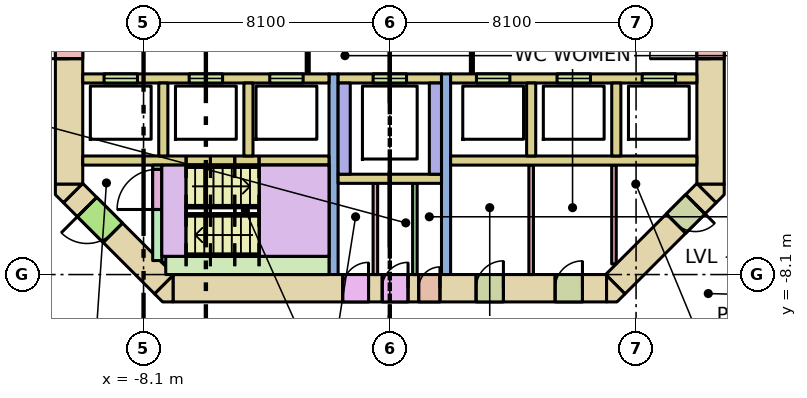
"""IFC4 building model, lengths in metres.
Left out: names, types, materials, properties, quantities, classifications, styles, units other than length and angle.
Written with IfcOpenShell. Run it as: python <this file> out.ifc"""

import sys

from ifc_helpers import new_model, si_unit, direction, frame, frame_2d, origin, place, context, subcontext, project, spatial, polyline, rectangle, outline, extrude, element, fill, save


model = new_model("IFC4")
c1 = context("Model", 3, precision=1e-05, world=origin(), true_north=direction((0.0, 1.0)))
c2 = subcontext(c1, "Body", "Model", "MODEL_VIEW")
j1 = project(units=[si_unit("LENGTHUNIT", "METRE"), si_unit("PLANEANGLEUNIT", "RADIAN")], contexts=[c1])
p1 = place(None, origin())
s1 = spatial("IfcSite", under=j1, at=p1, CompositionType="ELEMENT")
p2 = place(p1, origin())
s2 = spatial("IfcBuilding", under=s1, at=p2, CompositionType="ELEMENT")
p3 = place(p2, origin())
s3 = spatial("IfcBuildingStorey", under=s2, at=p3, CompositionType="ELEMENT", Elevation=0.0)
p4 = place(p3, frame((-7.13, -8.55, -0.32), z_axis=(0.0, 0.0, 1.0), x_axis=(1.0, 0.0, 0.0)))
e1 = element("IfcWall", 1, at=p4, inside=s3, PredefinedType="SHEAR", context=c2, shape_type="SweptSolid", body=[
    extrude(rectangle(XDim=14.26, YDim=0.9, at=frame_2d((7.13, 0.0))), origin(), (0.0, 0.0, 1.0), 6.0),
])
p5 = place(p4, frame((8.08, 0.0, 0.32)))
e2 = element("IfcOpeningElement", 2, at=p5, cuts=e1, PredefinedType="OPENING", context=c2, shape_type="SweptSolid", body=[
    extrude(rectangle(XDim=0.7, YDim=2.1, at=frame_2d((0.35, 1.05))), frame((0.0, 0.46, 0.0), z_axis=(0.0, -1.0, 0.0), x_axis=(1.0, 0.0, 0.0)), (0.0, 0.0, 1.0), 0.92),
])
p6 = place(p4, frame((5.58, 0.0, 0.32)))
e3 = element("IfcOpeningElement", 3, at=p6, cuts=e1, PredefinedType="OPENING", context=c2, shape_type="SweptSolid", body=[
    extrude(rectangle(XDim=0.85, YDim=2.1, at=frame_2d((0.425, 1.05))), frame((0.0, 0.46, 0.0), z_axis=(0.0, -1.0, 0.0), x_axis=(1.0, 0.0, 0.0)), (0.0, 0.0, 1.0), 0.92),
])
p7 = place(p4, frame((6.88, 0.0, 0.32)))
e4 = element("IfcOpeningElement", 4, at=p7, cuts=e1, PredefinedType="OPENING", context=c2, shape_type="SweptSolid", body=[
    extrude(rectangle(XDim=0.85, YDim=2.1, at=frame_2d((0.425, 1.05))), frame((0.0, 0.46, 0.0), z_axis=(0.0, -1.0, 0.0), x_axis=(1.0, 0.0, 0.0)), (0.0, 0.0, 1.0), 0.92),
])
p8 = place(p4, frame((9.967, 0.0, 0.32)))
e5 = element("IfcOpeningElement", 5, at=p8, cuts=e1, PredefinedType="OPENING", context=c2, shape_type="SweptSolid", body=[
    extrude(rectangle(XDim=0.9, YDim=2.1, at=frame_2d((0.45, 1.05))), frame((0.0, 0.46, 0.0), z_axis=(0.0, -1.0, 0.0), x_axis=(1.0, 0.0, 0.0)), (0.0, 0.0, 1.0), 0.92),
])
p9 = place(p4, frame((12.567, 0.0, 0.32)))
e6 = element("IfcOpeningElement", 6, at=p9, cuts=e1, PredefinedType="OPENING", context=c2, shape_type="SweptSolid", body=[
    extrude(rectangle(XDim=0.9, YDim=2.1, at=frame_2d((0.45, 1.05))), frame((0.0, 0.46, 0.0), z_axis=(0.0, -1.0, 0.0), x_axis=(1.0, 0.0, 0.0)), (0.0, 0.0, 1.0), 0.92),
])
p10 = place(p3, frame((-10.55, -5.13, -0.32), z_axis=(0.0, 0.0, 1.0), x_axis=(0.0, 1.0, 0.0)))
e7 = element("IfcWall", 7, at=p10, inside=s3, PredefinedType="SHEAR", context=c2, shape_type="SweptSolid", body=[
    extrude(rectangle(XDim=10.26, YDim=0.9, at=frame_2d((5.13, 0.0))), origin(), (0.0, 0.0, 1.0), 6.0),
])
p11 = place(p10, frame((4.13, 0.0, 0.32)))
e8 = element("IfcOpeningElement", 8, at=p11, cuts=e7, PredefinedType="OPENING", context=c2, shape_type="SweptSolid", body=[
    extrude(rectangle(XDim=2.0, YDim=2.1, at=frame_2d((1.0, 1.05))), frame((0.0, 0.46, 0.0), z_axis=(0.0, -1.0, 0.0), x_axis=(1.0, 0.0, 0.0)), (0.0, 0.0, 1.0), 0.92),
])
p12 = place(p3, frame((10.55, -5.13, -0.32), z_axis=(0.0, 0.0, 1.0), x_axis=(0.0, 1.0, 0.0)))
e9 = element("IfcWall", 9, at=p12, inside=s3, PredefinedType="SHEAR", context=c2, shape_type="SweptSolid", body=[
    extrude(rectangle(XDim=10.26, YDim=0.9, at=frame_2d((5.13, 0.0))), origin(), (0.0, 0.0, 1.0), 6.0),
])
p13 = place(p12, frame((4.13, 0.0, 0.32)))
e10 = element("IfcOpeningElement", 10, at=p13, cuts=e9, PredefinedType="OPENING", context=c2, shape_type="SweptSolid", body=[
    extrude(rectangle(XDim=2.0, YDim=2.1, at=frame_2d((1.0, 1.05))), frame((0.0, 0.46, 0.0), z_axis=(0.0, -1.0, 0.0), x_axis=(1.0, 0.0, 0.0)), (0.0, 0.0, 1.0), 0.92),
])
p14 = place(p3, frame((10.418, -5.418, -0.32), z_axis=(0.0, 0.0, 1.0), x_axis=(-0.707106781187, -0.707106781187, 0.0)))
e11 = element("IfcWall", 11, at=p14, inside=s3, PredefinedType="SHEAR", context=c2, shape_type="SweptSolid", body=[
    extrude(rectangle(XDim=4.243, YDim=0.9, at=frame_2d((2.121, 0.0))), origin(), (0.0, 0.0, 1.0), 6.0),
])
p15 = place(p14, frame((0.52, 0.0, 0.32)))
e12 = element("IfcOpeningElement", 12, at=p15, cuts=e11, PredefinedType="OPENING", context=c2, shape_type="SweptSolid", body=[
    extrude(rectangle(XDim=0.9, YDim=2.1, at=frame_2d((0.45, 1.05))), frame((0.0, 0.46, 0.0), z_axis=(0.0, -1.0, 0.0), x_axis=(1.0, 0.0, 0.0)), (0.0, 0.0, 1.0), 0.92),
])
p16 = place(p3, frame((-7.418, -8.418, -0.32), z_axis=(0.0, 0.0, 1.0), x_axis=(-0.707106781187, 0.707106781187, 0.0)))
e13 = element("IfcWall", 13, at=p16, inside=s3, PredefinedType="SHEAR", context=c2, shape_type="SweptSolid", body=[
    extrude(rectangle(XDim=4.243, YDim=0.9, at=frame_2d((2.121, 0.0))), origin(), (0.0, 0.0, 1.0), 6.0),
])
p17 = place(p16, frame((2.393, 0.0, 0.32)))
e14 = element("IfcOpeningElement", 14, at=p17, cuts=e13, PredefinedType="OPENING", context=c2, shape_type="SweptSolid", body=[
    extrude(rectangle(XDim=1.2, YDim=2.1, at=frame_2d((0.6, 1.05))), frame((0.0, 0.46, 0.0), z_axis=(0.0, -1.0, 0.0), x_axis=(1.0, 0.0, 0.0)), (0.0, 0.0, 1.0), 0.92),
])
p18 = place(p3, frame((0.0, 0.0, -0.32)))
e15 = element("IfcWall", 15, at=p18, inside=s3, PredefinedType="SHEAR", context=c2, shape_type="SweptSolid", body=[
    extrude(outline(polyline([(-7.473, -9.0), (-7.736, -8.736), (-7.13, -8.13), (-7.13, -9.0), (-7.473, -9.0)])), origin(), (0.0, 0.0, 1.0), 6.0),
])
p19 = place(p3, frame((0.0, 0.0, -0.32)))
e16 = element("IfcWall", 16, at=p19, inside=s3, PredefinedType="SHEAR", context=c2, shape_type="SweptSolid", body=[
    extrude(outline(polyline([(7.473, -9.0), (7.13, -9.0), (7.13, -8.13), (7.736, -8.736), (7.473, -9.0)])), origin(), (0.0, 0.0, 1.0), 6.0),
])
p20 = place(p3, frame((0.0, 0.0, -0.32)))
e17 = element("IfcWall", 17, at=p20, inside=s3, PredefinedType="SHEAR", context=c2, shape_type="SweptSolid", body=[
    extrude(outline(polyline([(-11.0, -5.473), (-11.0, -5.13), (-10.13, -5.13), (-10.736, -5.736), (-11.0, -5.473)])), origin(), (0.0, 0.0, 1.0), 6.0),
])
p21 = place(p3, frame((0.0, 0.0, -0.32)))
e18 = element("IfcWall", 18, at=p21, inside=s3, PredefinedType="SHEAR", context=c2, shape_type="SweptSolid", body=[
    extrude(outline(polyline([(11.0, -5.473), (10.736, -5.736), (10.13, -5.13), (11.0, -5.13), (11.0, -5.473)])), origin(), (0.0, 0.0, 1.0), 6.0),
])
for number, where, z_axis, x_axis in (
    (19, (-10.1, -4.35, 0.0), (0.0, 0.0, 1.0), (1.0, 0.0, 0.0)),
    (20, (2.0, -4.35, 0.0), (0.0, 0.0, 1.0), (1.0, 0.0, 0.0)),
):
    element("IfcWall", number, at=place(p3, frame(where, z_axis=z_axis, x_axis=x_axis)), inside=s3, PredefinedType="SOLIDWALL", context=c2, shape_type="SweptSolid", body=[
        extrude(rectangle(XDim=8.1, YDim=0.3, at=frame_2d((4.05, 0.0))), origin(), (0.0, 0.0, 1.0), 5.68),
    ])
p22 = place(p3, frame((-10.1, -1.65, 0.0), z_axis=(0.0, 0.0, 1.0), x_axis=(1.0, 0.0, 0.0)))
e21 = element("IfcWall", 21, at=p22, inside=s3, PredefinedType="SOLIDWALL", context=c2, shape_type="SweptSolid", body=[
    extrude(rectangle(XDim=8.1, YDim=0.3, at=frame_2d((4.05, 0.0))), origin(), (0.0, 0.0, 1.0), 5.68),
])
p23 = place(p22, frame((0.7, 0.0, 0.0)))
e22 = element("IfcOpeningElement", 22, at=p23, cuts=e21, PredefinedType="OPENING", context=c2, shape_type="SweptSolid", body=[
    extrude(rectangle(XDim=1.1, YDim=2.1, at=frame_2d((0.55, 1.05))), frame((0.0, 0.16, 0.0), z_axis=(0.0, -1.0, 0.0), x_axis=(1.0, 0.0, 0.0)), (0.0, 0.0, 1.0), 0.32),
])
p24 = place(p22, frame((3.5, 0.0, 0.0)))
e23 = element("IfcOpeningElement", 23, at=p24, cuts=e21, PredefinedType="OPENING", context=c2, shape_type="SweptSolid", body=[
    extrude(rectangle(XDim=1.1, YDim=2.1, at=frame_2d((0.55, 1.05))), frame((0.0, 0.16, 0.0), z_axis=(0.0, -1.0, 0.0), x_axis=(1.0, 0.0, 0.0)), (0.0, 0.0, 1.0), 0.32),
])
p25 = place(p22, frame((6.15, 0.0, 0.0)))
e24 = element("IfcOpeningElement", 24, at=p25, cuts=e21, PredefinedType="OPENING", context=c2, shape_type="SweptSolid", body=[
    extrude(rectangle(XDim=1.1, YDim=2.1, at=frame_2d((0.55, 1.05))), frame((0.0, 0.16, 0.0), z_axis=(0.0, -1.0, 0.0), x_axis=(1.0, 0.0, 0.0)), (0.0, 0.0, 1.0), 0.32),
])
p26 = place(p3, frame((2.0, -1.65, 0.0), z_axis=(0.0, 0.0, 1.0), x_axis=(1.0, 0.0, 0.0)))
e25 = element("IfcWall", 25, at=p26, inside=s3, PredefinedType="SOLIDWALL", context=c2, shape_type="SweptSolid", body=[
    extrude(rectangle(XDim=8.1, YDim=0.3, at=frame_2d((4.05, 0.0))), origin(), (0.0, 0.0, 1.0), 5.68),
])
p27 = place(p26, frame((0.85, 0.0, 0.0)))
e26 = element("IfcOpeningElement", 26, at=p27, cuts=e25, PredefinedType="OPENING", context=c2, shape_type="SweptSolid", body=[
    extrude(rectangle(XDim=1.1, YDim=2.1, at=frame_2d((0.55, 1.05))), frame((0.0, 0.16, 0.0), z_axis=(0.0, -1.0, 0.0), x_axis=(1.0, 0.0, 0.0)), (0.0, 0.0, 1.0), 0.32),
])
p28 = place(p26, frame((3.5, 0.0, 0.0)))
e27 = element("IfcOpeningElement", 27, at=p28, cuts=e25, PredefinedType="OPENING", context=c2, shape_type="SweptSolid", body=[
    extrude(rectangle(XDim=1.1, YDim=2.1, at=frame_2d((0.55, 1.05))), frame((0.0, 0.16, 0.0), z_axis=(0.0, -1.0, 0.0), x_axis=(1.0, 0.0, 0.0)), (0.0, 0.0, 1.0), 0.32),
])
p29 = place(p26, frame((6.3, 0.0, 0.0)))
e28 = element("IfcOpeningElement", 28, at=p29, cuts=e25, PredefinedType="OPENING", context=c2, shape_type="SweptSolid", body=[
    extrude(rectangle(XDim=1.1, YDim=2.1, at=frame_2d((0.55, 1.05))), frame((0.0, 0.16, 0.0), z_axis=(0.0, -1.0, 0.0), x_axis=(1.0, 0.0, 0.0)), (0.0, 0.0, 1.0), 0.32),
])
for number, where, z_axis, x_axis in (
    (29, (-7.45, -4.2, 0.0), (0.0, 0.0, 1.0), (0.0, 1.0, 0.0)),
    (30, (-4.65, -4.2, 0.0), (0.0, 0.0, 1.0), (0.0, 1.0, 0.0)),
    (31, (4.65, -4.2, 0.0), (0.0, 0.0, 1.0), (0.0, 1.0, 0.0)),
    (32, (7.45, -4.2, 0.0), (0.0, 0.0, 1.0), (0.0, 1.0, 0.0)),
):
    element("IfcWall", number, at=place(p3, frame(where, z_axis=z_axis, x_axis=x_axis)), inside=s3, PredefinedType="SOLIDWALL", context=c2, shape_type="SweptSolid", body=[
        extrude(rectangle(XDim=2.4, YDim=0.3, at=frame_2d((1.2, 0.0))), origin(), (0.0, 0.0, 1.0), 5.68),
    ])
for number, where, z_axis, x_axis in (
    (33, (-1.85, -8.1, 0.0), (0.0, 0.0, 1.0), (0.0, 1.0, 0.0)),
    (34, (1.85, -8.1, 0.0), (0.0, 0.0, 1.0), (0.0, 1.0, 0.0)),
):
    element("IfcWall", number, at=place(p3, frame(where, z_axis=z_axis, x_axis=x_axis)), inside=s3, PredefinedType="SHEAR", context=c2, shape_type="SweptSolid", body=[
        extrude(rectangle(XDim=6.6, YDim=0.3, at=frame_2d((3.3, 0.0))), origin(), (0.0, 0.0, 1.0), 5.68),
    ])
p30 = place(p3, frame((-1.7, -1.65, 0.0), z_axis=(0.0, 0.0, 1.0), x_axis=(1.0, 0.0, 0.0)))
e35 = element("IfcWall", 35, at=p30, inside=s3, PredefinedType="SOLIDWALL", context=c2, shape_type="SweptSolid", body=[
    extrude(rectangle(XDim=3.4, YDim=0.3, at=frame_2d((1.7, 0.0))), origin(), (0.0, 0.0, 1.0), 5.68),
])
p31 = place(p30, frame((1.15, 0.0, 0.0)))
e36 = element("IfcOpeningElement", 36, at=p31, cuts=e35, PredefinedType="OPENING", context=c2, shape_type="SweptSolid", body=[
    extrude(rectangle(XDim=1.1, YDim=2.1, at=frame_2d((0.55, 1.05))), frame((0.0, 0.16, 0.0), z_axis=(0.0, -1.0, 0.0), x_axis=(1.0, 0.0, 0.0)), (0.0, 0.0, 1.0), 0.32),
])
for number, where, z_axis, x_axis in (
    (37, (-1.5, -4.8, 0.0), (0.0, 0.0, 1.0), (0.0, 1.0, 0.0)),
    (38, (1.5, -4.8, 0.0), (0.0, 0.0, 1.0), (0.0, 1.0, 0.0)),
):
    element("IfcWall", number, at=place(p3, frame(where, z_axis=z_axis, x_axis=x_axis)), inside=s3, PredefinedType="SOLIDWALL", context=c2, shape_type="SweptSolid", body=[
        extrude(rectangle(XDim=3.0, YDim=0.4, at=frame_2d((1.5, 0.0))), origin(), (0.0, 0.0, 1.0), 5.68),
    ])
p32 = place(p3, frame((-1.7, -4.95, 0.0), z_axis=(0.0, 0.0, 1.0), x_axis=(1.0, 0.0, 0.0)))
e39 = element("IfcWall", 39, at=p32, inside=s3, PredefinedType="SOLIDWALL", context=c2, shape_type="SweptSolid", body=[
    extrude(rectangle(XDim=3.4, YDim=0.3, at=frame_2d((1.7, 0.0))), origin(), (0.0, 0.0, 1.0), 5.68),
])
p33 = place(p3, frame((-7.65, -7.64, 0.0), z_axis=(0.0, 0.0, 1.0), x_axis=(0.0, 1.0, 0.0)))
e40 = element("IfcWall", 40, at=p33, inside=s3, PredefinedType="SHEAR", context=c2, shape_type="SweptSolid", body=[
    extrude(rectangle(XDim=3.14, YDim=0.3, at=frame_2d((1.57, 0.0))), origin(), (0.0, 0.0, 1.0), 5.68),
])
p34 = place(p33, frame((1.68, 0.0, 0.0)))
e41 = element("IfcOpeningElement", 41, at=p34, cuts=e40, PredefinedType="OPENING", context=c2, shape_type="SweptSolid", body=[
    extrude(rectangle(XDim=1.32, YDim=2.1, at=frame_2d((0.66, 1.05))), frame((0.0, 0.16, 0.0), z_axis=(0.0, -1.0, 0.0), x_axis=(1.0, 0.0, 0.0)), (0.0, 0.0, 1.0), 0.32),
])
p35 = place(p3, frame((-7.5, -7.6, 0.0), z_axis=(0.0, 0.0, 1.0), x_axis=(1.0, 0.0, 0.0)))
e42 = element("IfcWall", 42, at=p35, inside=s3, PredefinedType="SHEAR", context=c2, shape_type="SweptSolid", body=[
    extrude(rectangle(XDim=0.6, YDim=0.2, at=frame_2d((0.3, 0.0))), origin(), (0.0, 0.0, 1.0), 5.68),
])
p36 = place(p3, frame((-7.37, -7.8, 0.0), z_axis=(0.0, 0.0, 1.0), x_axis=(1.0, 0.0, 0.0)))
e43 = element("IfcWall", 43, at=p36, inside=s3, PredefinedType="SHEAR", context=c2, shape_type="SweptSolid", body=[
    extrude(rectangle(XDim=5.37, YDim=0.6, at=frame_2d((2.685, 0.0))), origin(), (0.0, 0.0, 1.0), 5.68),
])
p37 = place(p3, frame((-2.7, -1.5, 0.0), z_axis=(0.0, 0.0, 1.0), x_axis=(0.0, 1.0, 0.0)))
e44 = element("IfcWall", 44, at=p37, inside=s3, PredefinedType="PARTITIONING", context=c2, shape_type="SweptSolid", body=[
    extrude(rectangle(XDim=3.0, YDim=0.1, at=frame_2d((1.5, 0.0))), origin(), (0.0, 0.0, 1.0), 5.68),
])
p38 = place(p37, frame((0.9, 0.0, 0.0)))
e45 = element("IfcOpeningElement", 45, at=p38, cuts=e44, PredefinedType="OPENING", context=c2, shape_type="SweptSolid", body=[
    extrude(rectangle(XDim=1.2, YDim=2.1, at=frame_2d((0.6, 1.05))), frame((0.0, 0.06, 0.0), z_axis=(0.0, -1.0, 0.0), x_axis=(1.0, 0.0, 0.0)), (0.0, 0.0, 1.0), 0.12),
])
p39 = place(p3, frame((2.7, -1.5, 0.0), z_axis=(0.0, 0.0, 1.0), x_axis=(0.0, 1.0, 0.0)))
e46 = element("IfcWall", 46, at=p39, inside=s3, PredefinedType="PARTITIONING", context=c2, shape_type="SweptSolid", body=[
    extrude(rectangle(XDim=3.0, YDim=0.1, at=frame_2d((1.5, 0.0))), origin(), (0.0, 0.0, 1.0), 5.68),
])
p40 = place(p39, frame((0.9, 0.0, 0.0)))
e47 = element("IfcOpeningElement", 47, at=p40, cuts=e46, PredefinedType="OPENING", context=c2, shape_type="SweptSolid", body=[
    extrude(rectangle(XDim=1.2, YDim=2.1, at=frame_2d((0.6, 1.05))), frame((0.0, 0.06, 0.0), z_axis=(0.0, -1.0, 0.0), x_axis=(1.0, 0.0, 0.0)), (0.0, 0.0, 1.0), 0.12),
])
for number, where, z_axis, x_axis in (
    (48, (0.825, -8.1, 0.0), (0.0, 0.0, 1.0), (0.0, 1.0, 0.0)),
    (49, (-0.475, -8.1, 0.0), (0.0, 0.0, 1.0), (0.0, 1.0, 0.0)),
):
    element("IfcWall", number, at=place(p3, frame(where, z_axis=z_axis, x_axis=x_axis)), inside=s3, PredefinedType="PARTITIONING", context=c2, shape_type="SweptSolid", body=[
        extrude(rectangle(XDim=3.0, YDim=0.15, at=frame_2d((1.5, 0.0))), origin(), (0.0, 0.0, 1.0), 5.68),
    ])
p41 = place(p3, frame((4.649, -8.1, 0.0), z_axis=(0.0, 0.0, 1.0), x_axis=(0.0, 1.0, 0.0)))
e50 = element("IfcWall", 50, at=p41, inside=s3, PredefinedType="PARTITIONING", context=c2, shape_type="SweptSolid", body=[
    extrude(rectangle(XDim=3.6, YDim=0.15, at=frame_2d((1.8, 0.0))), origin(), (0.0, 0.0, 1.0), 5.68),
])
p42 = place(p3, frame((7.373, -7.752, 0.0), z_axis=(0.0, 0.0, 1.0), x_axis=(0.0, 1.0, 0.0)))
e51 = element("IfcWall", 51, at=p42, inside=s3, PredefinedType="PARTITIONING", context=c2, shape_type="SweptSolid", body=[
    extrude(rectangle(XDim=3.252, YDim=0.15, at=frame_2d((1.626, 0.0))), origin(), (0.0, 0.0, 1.0), 5.68),
])
p43 = place(p23, origin())
e52 = element("IfcDoor", 52, at=p43, inside=s3, OperationType="DOUBLE_DOOR_SLIDING", PredefinedType="DOOR", context=c2, shape_type="SweptSolid", body=[
    extrude(rectangle(XDim=1.1, YDim=2.1, at=frame_2d((0.55, 1.05))), frame((0.0, 0.025, 0.0), z_axis=(0.0, -1.0, 0.0), x_axis=(1.0, 0.0, 0.0)), (0.0, 0.0, 1.0), 0.05),
])
fill(e22, e52)
p44 = place(p24, origin())
e53 = element("IfcDoor", 53, at=p44, inside=s3, OperationType="DOUBLE_DOOR_SLIDING", PredefinedType="DOOR", context=c2, shape_type="SweptSolid", body=[
    extrude(rectangle(XDim=1.1, YDim=2.1, at=frame_2d((0.55, 1.05))), frame((0.0, 0.025, 0.0), z_axis=(0.0, -1.0, 0.0), x_axis=(1.0, 0.0, 0.0)), (0.0, 0.0, 1.0), 0.05),
])
fill(e23, e53)
p45 = place(p25, origin())
e54 = element("IfcDoor", 54, at=p45, inside=s3, OperationType="DOUBLE_DOOR_SLIDING", PredefinedType="DOOR", context=c2, shape_type="SweptSolid", body=[
    extrude(rectangle(XDim=1.1, YDim=2.1, at=frame_2d((0.55, 1.05))), frame((0.0, 0.025, 0.0), z_axis=(0.0, -1.0, 0.0), x_axis=(1.0, 0.0, 0.0)), (0.0, 0.0, 1.0), 0.05),
])
fill(e24, e54)
p46 = place(p27, origin())
e55 = element("IfcDoor", 55, at=p46, inside=s3, OperationType="DOUBLE_DOOR_SLIDING", PredefinedType="DOOR", context=c2, shape_type="SweptSolid", body=[
    extrude(rectangle(XDim=1.1, YDim=2.1, at=frame_2d((0.55, 1.05))), frame((0.0, 0.025, 0.0), z_axis=(0.0, -1.0, 0.0), x_axis=(1.0, 0.0, 0.0)), (0.0, 0.0, 1.0), 0.05),
])
fill(e26, e55)
p47 = place(p28, origin())
e56 = element("IfcDoor", 56, at=p47, inside=s3, OperationType="DOUBLE_DOOR_SLIDING", PredefinedType="DOOR", context=c2, shape_type="SweptSolid", body=[
    extrude(rectangle(XDim=1.1, YDim=2.1, at=frame_2d((0.55, 1.05))), frame((0.0, 0.025, 0.0), z_axis=(0.0, -1.0, 0.0), x_axis=(1.0, 0.0, 0.0)), (0.0, 0.0, 1.0), 0.05),
])
fill(e27, e56)
p48 = place(p29, origin())
e57 = element("IfcDoor", 57, at=p48, inside=s3, OperationType="DOUBLE_DOOR_SLIDING", PredefinedType="DOOR", context=c2, shape_type="SweptSolid", body=[
    extrude(rectangle(XDim=1.1, YDim=2.1, at=frame_2d((0.55, 1.05))), frame((0.0, 0.025, 0.0), z_axis=(0.0, -1.0, 0.0), x_axis=(1.0, 0.0, 0.0)), (0.0, 0.0, 1.0), 0.05),
])
fill(e28, e57)
p49 = place(p31, origin())
e58 = element("IfcDoor", 58, at=p49, inside=s3, OperationType="DOUBLE_DOOR_SLIDING", PredefinedType="DOOR", context=c2, shape_type="SweptSolid", body=[
    extrude(rectangle(XDim=1.1, YDim=2.1, at=frame_2d((0.55, 1.05))), frame((0.0, 0.025, 0.0), z_axis=(0.0, -1.0, 0.0), x_axis=(1.0, 0.0, 0.0)), (0.0, 0.0, 1.0), 0.05),
])
fill(e36, e58)
p50 = place(p34, origin())
e59 = element("IfcDoor", 59, at=p50, inside=s3, OperationType="DOUBLE_DOOR_SINGLE_SWING", PredefinedType="DOOR", context=c2, shape_type="SweptSolid", body=[
    extrude(rectangle(XDim=1.32, YDim=2.1, at=frame_2d((0.66, 1.05))), frame((0.0, 0.025, 0.0), z_axis=(0.0, -1.0, 0.0), x_axis=(1.0, 0.0, 0.0)), (0.0, 0.0, 1.0), 0.05),
])
fill(e41, e59)
p51 = place(p17, origin())
e60 = element("IfcDoor", 60, at=p51, inside=s3, OperationType="SINGLE_SWING_RIGHT", PredefinedType="DOOR", context=c2, shape_type="SweptSolid", body=[
    extrude(rectangle(XDim=1.2, YDim=2.1, at=frame_2d((0.6, 1.05))), frame((0.0, 0.025, 0.0), z_axis=(0.0, -1.0, 0.0), x_axis=(1.0, 0.0, 0.0)), (0.0, 0.0, 1.0), 0.05),
])
fill(e14, e60)
p52 = place(p11, origin())
e61 = element("IfcDoor", 61, at=p52, inside=s3, OperationType="DOUBLE_DOOR_SINGLE_SWING", PredefinedType="DOOR", context=c2, shape_type="SweptSolid", body=[
    extrude(rectangle(XDim=2.0, YDim=2.1, at=frame_2d((1.0, 1.05))), frame((0.0, 0.025, 0.0), z_axis=(0.0, -1.0, 0.0), x_axis=(1.0, 0.0, 0.0)), (0.0, 0.0, 1.0), 0.05),
])
fill(e8, e61)
p53 = place(p13, origin())
e62 = element("IfcDoor", 62, at=p53, inside=s3, OperationType="DOUBLE_DOOR_SINGLE_SWING", PredefinedType="DOOR", context=c2, shape_type="SweptSolid", body=[
    extrude(rectangle(XDim=2.0, YDim=2.1, at=frame_2d((1.0, 1.05))), frame((0.0, 0.025, 0.0), z_axis=(0.0, -1.0, 0.0), x_axis=(1.0, 0.0, 0.0)), (0.0, 0.0, 1.0), 0.05),
])
fill(e10, e62)
p54 = place(p5, origin())
e63 = element("IfcDoor", 63, at=p54, inside=s3, OperationType="SINGLE_SWING_RIGHT", PredefinedType="DOOR", context=c2, shape_type="SweptSolid", body=[
    extrude(rectangle(XDim=0.7, YDim=2.1, at=frame_2d((0.35, 1.05))), frame((0.0, 0.025, 0.0), z_axis=(0.0, -1.0, 0.0), x_axis=(1.0, 0.0, 0.0)), (0.0, 0.0, 1.0), 0.05),
])
fill(e2, e63)
p55 = place(p6, origin())
e64 = element("IfcDoor", 64, at=p55, inside=s3, OperationType="SINGLE_SWING_RIGHT", PredefinedType="DOOR", context=c2, shape_type="SweptSolid", body=[
    extrude(rectangle(XDim=0.85, YDim=2.1, at=frame_2d((0.425, 1.05))), frame((0.0, 0.025, 0.0), z_axis=(0.0, -1.0, 0.0), x_axis=(1.0, 0.0, 0.0)), (0.0, 0.0, 1.0), 0.05),
])
fill(e3, e64)
p56 = place(p7, origin())
e65 = element("IfcDoor", 65, at=p56, inside=s3, OperationType="SINGLE_SWING_RIGHT", PredefinedType="DOOR", context=c2, shape_type="SweptSolid", body=[
    extrude(rectangle(XDim=0.85, YDim=2.1, at=frame_2d((0.425, 1.05))), frame((0.0, 0.025, 0.0), z_axis=(0.0, -1.0, 0.0), x_axis=(1.0, 0.0, 0.0)), (0.0, 0.0, 1.0), 0.05),
])
fill(e4, e65)
p57 = place(p8, origin())
e66 = element("IfcDoor", 66, at=p57, inside=s3, OperationType="SINGLE_SWING_RIGHT", PredefinedType="DOOR", context=c2, shape_type="SweptSolid", body=[
    extrude(rectangle(XDim=0.9, YDim=2.1, at=frame_2d((0.45, 1.05))), frame((0.0, 0.025, 0.0), z_axis=(0.0, -1.0, 0.0), x_axis=(1.0, 0.0, 0.0)), (0.0, 0.0, 1.0), 0.05),
])
fill(e5, e66)
p58 = place(p9, origin())
e67 = element("IfcDoor", 67, at=p58, inside=s3, OperationType="SINGLE_SWING_RIGHT", PredefinedType="DOOR", context=c2, shape_type="SweptSolid", body=[
    extrude(rectangle(XDim=0.9, YDim=2.1, at=frame_2d((0.45, 1.05))), frame((0.0, 0.025, 0.0), z_axis=(0.0, -1.0, 0.0), x_axis=(1.0, 0.0, 0.0)), (0.0, 0.0, 1.0), 0.05),
])
fill(e6, e67)
p59 = place(p15, origin())
e68 = element("IfcDoor", 68, at=p59, inside=s3, OperationType="SINGLE_SWING_LEFT", PredefinedType="DOOR", context=c2, shape_type="SweptSolid", body=[
    extrude(rectangle(XDim=0.9, YDim=2.1, at=frame_2d((0.45, 1.05))), frame((0.0, 0.025, 0.0), z_axis=(0.0, -1.0, 0.0), x_axis=(1.0, 0.0, 0.0)), (0.0, 0.0, 1.0), 0.05),
])
fill(e12, e68)
save(model, sys.argv[1])
